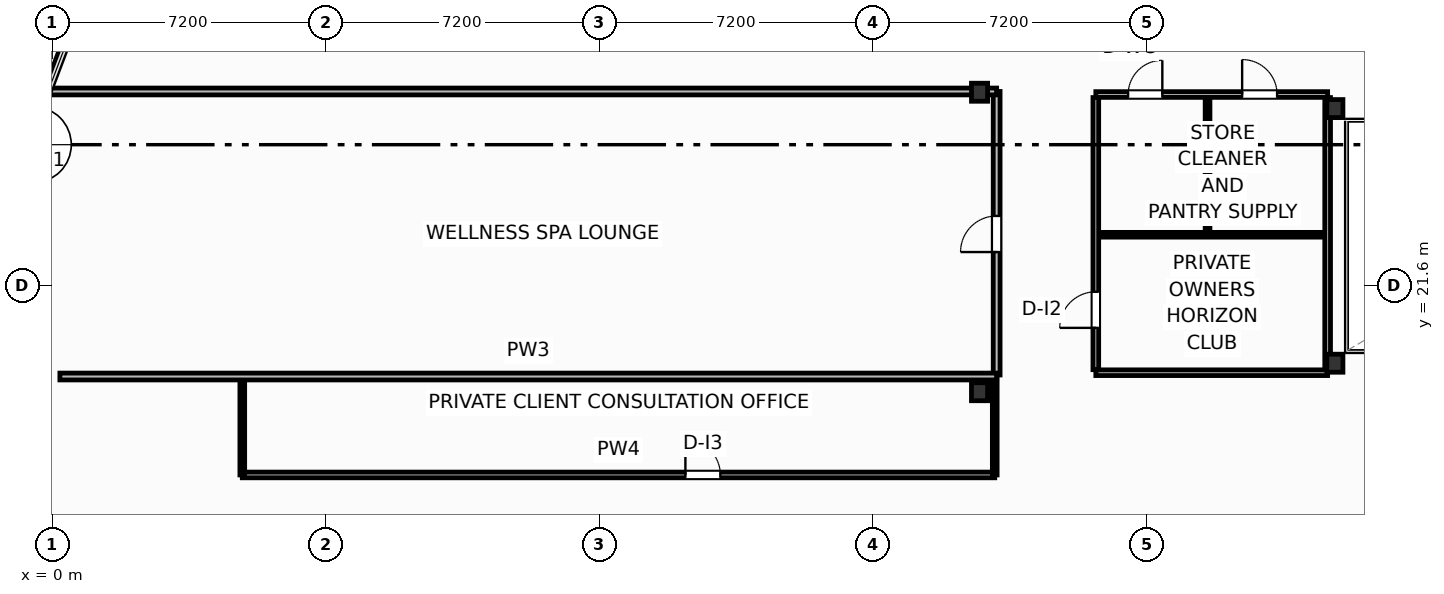
"""IFC4 building model, lengths in metres.
Left out: names, types, materials, properties, quantities, classifications, styles, units other than length and angle.
Written with IfcOpenShell. Run it as: python <this file> out.ifc"""

import sys

from ifc_helpers import new_model, si_unit, direction, frame, frame_2d, origin, origin_2d, place, context, subcontext, project, spatial, rectangle, i_section, extrude, element, fill, save


model = new_model("IFC4")
c1 = context("Model", 3, precision=1e-05, world=origin(), true_north=direction((0.0, 1.0)))
c2 = subcontext(c1, "Body", "Model", "MODEL_VIEW")
j1 = project(units=[si_unit("LENGTHUNIT", "METRE"), si_unit("PLANEANGLEUNIT", "RADIAN")], contexts=[c1])
p1 = place(None, origin())
s1 = spatial("IfcSite", under=j1, at=p1, CompositionType="ELEMENT")
p2 = place(p1, origin())
s2 = spatial("IfcBuilding", under=s1, at=p2, CompositionType="ELEMENT")
p3 = place(p2, frame((0.0, 0.0, 109.5)))
s3 = spatial("IfcBuildingStorey", under=s2, at=p3, CompositionType="ELEMENT", Elevation=109.5)
for number, where, z_axis, x_axis in (
    (1, (33.75, 19.55, 0.0), (0.0, 0.0, 1.0), (1.0, 0.0, 0.0)),
    (2, (33.75, 26.25, 0.0), (0.0, 0.0, 1.0), (1.0, 0.0, 0.0)),
    (3, (24.4, 18.8, 0.0), (0.0, 0.0, 1.0), (1.0, 0.0, 0.0)),
    (4, (24.4, 26.68, 0.0), (0.0, 0.0, 1.0), (1.0, 0.0, 0.0)),
):
    element("IfcColumn", number, at=place(p3, frame(where, z_axis=z_axis, x_axis=x_axis)), inside=s3, PredefinedType="COLUMN", context=c2, shape_type="SweptSolid", body=[
        extrude(i_section(OverallWidth=0.424, OverallDepth=0.474, WebThickness=0.048, FlangeThickness=0.077, FilletRadius=0.025, at=origin_2d()), origin(), (0.0, 0.0, 1.0), 3.7),
    ])
p4 = place(p3, frame((5.0, 16.61, 0.0), z_axis=(0.0, 0.0, 1.0), x_axis=(1.0, 0.0, 0.0)))
e5 = element("IfcWall", 5, at=p4, inside=s3, PredefinedType="PARTITIONING", context=c2, shape_type="SweptSolid", body=[
    extrude(rectangle(XDim=19.8, YDim=0.15, at=frame_2d((9.9, 0.0))), origin(), (0.0, 0.0, 1.0), 3.45),
])
p5 = place(p4, frame((11.66, 0.0, 0.0)))
e6 = element("IfcOpeningElement", 6, at=p5, cuts=e5, PredefinedType="OPENING", context=c2, shape_type="SweptSolid", body=[
    extrude(rectangle(XDim=0.92, YDim=2.05, at=frame_2d((0.46, 1.025))), frame((0.0, 0.085, 0.0), z_axis=(0.0, -1.0, 0.0), x_axis=(1.0, 0.0, 0.0)), (0.0, 0.0, 1.0), 0.17),
])
for number, where, z_axis, x_axis in (
    (7, (5.0, 16.61, 0.0), (0.0, 0.0, 1.0), (0.0, 1.0, 0.0)),
    (8, (24.8, 16.61, 0.0), (0.0, 0.0, 1.0), (0.0, 1.0, 0.0)),
):
    element("IfcWall", number, at=place(p3, frame(where, z_axis=z_axis, x_axis=x_axis)), inside=s3, PredefinedType="PARTITIONING", context=c2, shape_type="SweptSolid", body=[
        extrude(rectangle(XDim=2.63, YDim=0.125, at=frame_2d((1.315, 0.0))), origin(), (0.0, 0.0, 1.0), 3.45),
    ])
p6 = place(p3, frame((24.85, 19.24, 0.0), z_axis=(0.0, 0.0, 1.0), x_axis=(0.0, 1.0, 0.0)))
e9 = element("IfcWall", 9, at=p6, inside=s3, PredefinedType="PARTITIONING", context=c2, shape_type="SweptSolid", body=[
    extrude(rectangle(XDim=7.46, YDim=0.18, at=frame_2d((3.73, 0.0))), origin(), (0.0, 0.0, 1.0), 3.45),
])
p7 = place(p6, frame((3.235, 0.0, 0.0)))
e10 = element("IfcOpeningElement", 10, at=p7, cuts=e9, PredefinedType="OPENING", context=c2, shape_type="SweptSolid", body=[
    extrude(rectangle(XDim=0.95, YDim=2.05, at=frame_2d((0.475, 1.025))), frame((0.0, 0.1, 0.0), z_axis=(0.0, -1.0, 0.0), x_axis=(1.0, 0.0, 0.0)), (0.0, 0.0, 1.0), 0.2),
])
p8 = place(p3, frame((0.2, 19.2, 0.0), z_axis=(0.0, 0.0, 1.0), x_axis=(1.0, 0.0, 0.0)))
e11 = element("IfcWall", 11, at=p8, inside=s3, PredefinedType="PARTITIONING", context=c2, shape_type="SweptSolid", body=[
    extrude(rectangle(XDim=24.65, YDim=0.18, at=frame_2d((12.325, 0.0))), origin(), (0.0, 0.0, 1.0), 3.45),
])
p9 = place(p3, frame((-0.071, 26.7, 0.0), z_axis=(0.0, 0.0, 1.0), x_axis=(1.0, 0.0, 0.0)))
e12 = element("IfcWall", 12, at=p9, inside=s3, PredefinedType="PARTITIONING", context=c2, shape_type="SweptSolid", body=[
    extrude(rectangle(XDim=24.921, YDim=0.18, at=frame_2d((12.46, 0.0))), origin(), (0.0, 0.0, 1.0), 2.662),
])
p10 = place(p3, frame((27.46, 19.3, 0.0), z_axis=(0.0, 0.0, 1.0), x_axis=(1.0, 0.0, 0.0)))
e13 = element("IfcWall", 13, at=p10, inside=s3, PredefinedType="PARTITIONING", context=c2, shape_type="SweptSolid", body=[
    extrude(rectangle(XDim=6.1, YDim=0.15, at=frame_2d((3.05, 0.0))), origin(), (0.0, 0.0, 1.0), 2.662),
])
p11 = place(p3, frame((27.46, 26.62, 0.0), z_axis=(0.0, 0.0, 1.0), x_axis=(1.0, 0.0, 0.0)))
e14 = element("IfcWall", 14, at=p11, inside=s3, PredefinedType="PARTITIONING", context=c2, shape_type="SweptSolid", body=[
    extrude(rectangle(XDim=6.1, YDim=0.15, at=frame_2d((3.05, 0.0))), origin(), (0.0, 0.0, 1.0), 2.662),
])
p12 = place(p11, frame((0.85, 0.0, 0.0)))
e15 = element("IfcOpeningElement", 15, at=p12, cuts=e14, PredefinedType="OPENING", context=c2, shape_type="SweptSolid", body=[
    extrude(rectangle(XDim=0.9, YDim=2.05, at=frame_2d((0.45, 1.025))), frame((0.0, 0.085, 0.0), z_axis=(0.0, -1.0, 0.0), x_axis=(1.0, 0.0, 0.0)), (0.0, 0.0, 1.0), 0.17),
])
p13 = place(p11, frame((3.85, 0.0, 0.0)))
e16 = element("IfcOpeningElement", 16, at=p13, cuts=e14, PredefinedType="OPENING", context=c2, shape_type="SweptSolid", body=[
    extrude(rectangle(XDim=0.92, YDim=2.05, at=frame_2d((0.46, 1.025))), frame((0.0, 0.085, 0.0), z_axis=(0.0, -1.0, 0.0), x_axis=(1.0, 0.0, 0.0)), (0.0, 0.0, 1.0), 0.17),
])
p14 = place(p3, frame((27.52, 22.93, 0.0), z_axis=(0.0, 0.0, 1.0), x_axis=(1.0, 0.0, 0.0)))
e17 = element("IfcWall", 17, at=p14, inside=s3, PredefinedType="PARTITIONING", context=c2, shape_type="SweptSolid", body=[
    extrude(rectangle(XDim=6.0, YDim=0.125, at=frame_2d((3.0, 0.0))), origin(), (0.0, 0.0, 1.0), 3.45),
])
p15 = place(p3, frame((30.4, 23.0, 0.0), z_axis=(0.0, 0.0, 1.0), x_axis=(0.0, 1.0, 0.0)))
e18 = element("IfcWall", 18, at=p15, inside=s3, PredefinedType="PARTITIONING", context=c2, shape_type="SweptSolid", body=[
    extrude(rectangle(XDim=3.54, YDim=0.125, at=frame_2d((1.77, 0.0))), origin(), (0.0, 0.0, 1.0), 3.45),
])
p16 = place(p3, frame((27.46, 19.38, 0.0), z_axis=(0.0, 0.0, 1.0), x_axis=(0.0, 1.0, 0.0)))
e19 = element("IfcWall", 19, at=p16, inside=s3, PredefinedType="PARTITIONING", context=c2, shape_type="SweptSolid", body=[
    extrude(rectangle(XDim=7.16, YDim=0.15, at=frame_2d((3.58, 0.0))), origin(), (0.0, 0.0, 1.0), 3.45),
])
p17 = place(p16, frame((1.1, 0.0, 0.0)))
e20 = element("IfcOpeningElement", 20, at=p17, cuts=e19, PredefinedType="OPENING", context=c2, shape_type="SweptSolid", body=[
    extrude(rectangle(XDim=0.95, YDim=2.05, at=frame_2d((0.475, 1.025))), frame((0.0, 0.085, 0.0), z_axis=(0.0, -1.0, 0.0), x_axis=(1.0, 0.0, 0.0)), (0.0, 0.0, 1.0), 0.17),
])
p18 = place(p3, frame((33.56, 19.38, 0.0), z_axis=(0.0, 0.0, 1.0), x_axis=(0.0, 1.0, 0.0)))
e21 = element("IfcWall", 21, at=p18, inside=s3, PredefinedType="PARTITIONING", context=c2, shape_type="SweptSolid", body=[
    extrude(rectangle(XDim=7.16, YDim=0.15, at=frame_2d((3.58, 0.0))), origin(), (0.0, 0.0, 1.0), 2.824),
])
p19 = place(p5, origin())
e22 = element("IfcDoor", 22, at=p19, inside=s3, OperationType="SINGLE_SWING_LEFT", PredefinedType="DOOR", context=c2, shape_type="SweptSolid", body=[
    extrude(rectangle(XDim=0.92, YDim=2.05, at=frame_2d((0.46, 1.025))), frame((0.0, 0.025, 0.0), z_axis=(0.0, -1.0, 0.0), x_axis=(1.0, 0.0, 0.0)), (0.0, 0.0, 1.0), 0.05),
])
fill(e6, e22)
p20 = place(p7, origin())
e23 = element("IfcDoor", 23, at=p20, inside=s3, OperationType="SINGLE_SWING_LEFT", PredefinedType="DOOR", context=c2, shape_type="SweptSolid", body=[
    extrude(rectangle(XDim=0.95, YDim=2.05, at=frame_2d((0.475, 1.025))), frame((0.0, 0.025, 0.0), z_axis=(0.0, -1.0, 0.0), x_axis=(1.0, 0.0, 0.0)), (0.0, 0.0, 1.0), 0.05),
])
fill(e10, e23)
p21 = place(p12, origin())
e24 = element("IfcDoor", 24, at=p21, inside=s3, OperationType="SINGLE_SWING_RIGHT", PredefinedType="DOOR", context=c2, shape_type="SweptSolid", body=[
    extrude(rectangle(XDim=0.9, YDim=2.05, at=frame_2d((0.45, 1.025))), frame((0.0, 0.025, 0.0), z_axis=(0.0, -1.0, 0.0), x_axis=(1.0, 0.0, 0.0)), (0.0, 0.0, 1.0), 0.05),
])
fill(e15, e24)
p22 = place(p13, origin())
e25 = element("IfcDoor", 25, at=p22, inside=s3, OperationType="SINGLE_SWING_LEFT", PredefinedType="DOOR", context=c2, shape_type="SweptSolid", body=[
    extrude(rectangle(XDim=0.92, YDim=2.05, at=frame_2d((0.46, 1.025))), frame((0.0, 0.025, 0.0), z_axis=(0.0, -1.0, 0.0), x_axis=(1.0, 0.0, 0.0)), (0.0, 0.0, 1.0), 0.05),
])
fill(e16, e25)
p23 = place(p17, origin())
e26 = element("IfcDoor", 26, at=p23, inside=s3, OperationType="SINGLE_SWING_LEFT", PredefinedType="DOOR", context=c2, shape_type="SweptSolid", body=[
    extrude(rectangle(XDim=0.95, YDim=2.05, at=frame_2d((0.475, 1.025))), frame((0.0, 0.025, 0.0), z_axis=(0.0, -1.0, 0.0), x_axis=(1.0, 0.0, 0.0)), (0.0, 0.0, 1.0), 0.05),
])
fill(e20, e26)
save(model, sys.argv[1])
